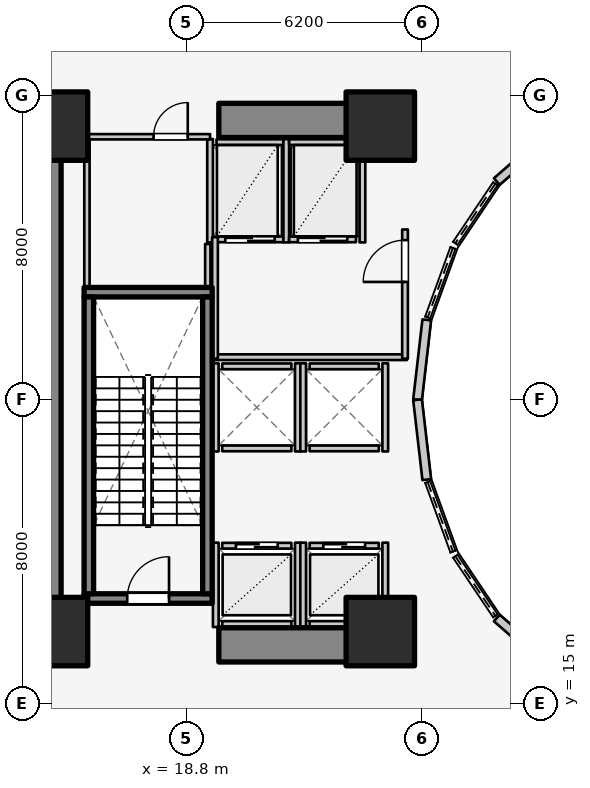
"""IFC4 building model, lengths in metres.
Left out: names, types, materials, properties, quantities, classifications, styles, units other than length and angle.
Written with IfcOpenShell. Run it as: python <this file> out.ifc"""

import sys

from ifc_helpers import new_model, si_unit, direction, frame, frame_2d, origin, origin_2d, place, context, subcontext, project, spatial, rectangle, extrude, element, fill, save


model = new_model("IFC4")
c1 = context("Model", 3, precision=1e-05, world=origin(), true_north=direction((0.0, 1.0)))
c2 = subcontext(c1, "Body", "Model", "MODEL_VIEW")
j1 = project(units=[si_unit("LENGTHUNIT", "METRE"), si_unit("PLANEANGLEUNIT", "RADIAN")], contexts=[c1])
p1 = place(None, origin())
s1 = spatial("IfcSite", under=j1, at=p1, CompositionType="ELEMENT")
p2 = place(p1, origin())
s2 = spatial("IfcBuilding", under=s1, at=p2, CompositionType="ELEMENT")
p3 = place(p2, frame((0.0, 0.0, 4.6)))
s3 = spatial("IfcBuildingStorey", under=s2, at=p3, CompositionType="ELEMENT", Elevation=4.6)
p4 = place(p3, frame((15.05, 17.05, 0.0), z_axis=(0.0, 0.0, 1.0), x_axis=(0.0, 1.0, 0.0)))
e1 = element("IfcWall", 1, at=p4, inside=s3, PredefinedType="SHEAR", context=c2, shape_type="SweptSolid", body=[
    extrude(rectangle(XDim=12.8, YDim=0.9, at=frame_2d((6.4, 0.0))), origin(), (0.0, 0.0, 1.0), 4.6),
])
for number, where, z_axis, x_axis in (
    (2, (19.65, 16.55, 0.0), (0.0, 0.0, 1.0), (1.0, 0.0, 0.0)),
    (3, (19.65, 30.35, 0.0), (0.0, 0.0, 1.0), (1.0, 0.0, 0.0)),
):
    element("IfcWall", number, at=place(p3, frame(where, z_axis=z_axis, x_axis=x_axis)), inside=s3, PredefinedType="SHEAR", context=c2, shape_type="SweptSolid", body=[
        extrude(rectangle(XDim=4.5, YDim=0.9, at=frame_2d((2.25, 0.0))), origin(), (0.0, 0.0, 1.0), 4.6),
    ])
p5 = place(p3, frame((16.105, 17.77, 0.0), z_axis=(0.0, 0.0, 1.0), x_axis=(1.0, 0.0, 0.0)))
e4 = element("IfcWall", 4, at=p5, inside=s3, PredefinedType="SOLIDWALL", context=c2, shape_type="SweptSolid", body=[
    extrude(rectangle(XDim=3.37, YDim=0.25, at=frame_2d((1.685, 0.0))), origin(), (0.0, 0.0, 1.0), 4.6),
])
p6 = place(p5, frame((1.135, 0.0, 0.0)))
e5 = element("IfcOpeningElement", 5, at=p6, cuts=e4, PredefinedType="OPENING", context=c2, shape_type="SweptSolid", body=[
    extrude(rectangle(XDim=1.1, YDim=2.1, at=frame_2d((0.55, 1.05))), frame((0.0, 0.135, 0.0), z_axis=(0.0, -1.0, 0.0), x_axis=(1.0, 0.0, 0.0)), (0.0, 0.0, 1.0), 0.27),
])
p7 = place(p3, frame((16.105, 25.83, 0.0), z_axis=(0.0, 0.0, 1.0), x_axis=(1.0, 0.0, 0.0)))
e6 = element("IfcWall", 6, at=p7, inside=s3, PredefinedType="SOLIDWALL", context=c2, shape_type="SweptSolid", body=[
    extrude(rectangle(XDim=3.37, YDim=0.25, at=frame_2d((1.685, 0.0))), origin(), (0.0, 0.0, 1.0), 4.6),
])
for number, where, z_axis, x_axis in (
    (7, (16.23, 17.895, 0.0), (0.0, 0.0, 1.0), (0.0, 1.0, 0.0)),
    (8, (19.35, 17.895, 0.0), (0.0, 0.0, 1.0), (0.0, 1.0, 0.0)),
):
    element("IfcWall", number, at=place(p3, frame(where, z_axis=z_axis, x_axis=x_axis)), inside=s3, PredefinedType="SOLIDWALL", context=c2, shape_type="SweptSolid", body=[
        extrude(rectangle(XDim=7.81, YDim=0.25, at=frame_2d((3.905, 0.0))), origin(), (0.0, 0.0, 1.0), 4.6),
    ])
for number, where, z_axis, x_axis in (
    (9, (15.3, 16.9, 0.0), (0.0, 0.0, 1.0), (1.0, 0.0, 0.0)),
    (10, (23.9, 16.9, 0.0), (0.0, 0.0, 1.0), (1.0, 0.0, 0.0)),
    (11, (23.9, 30.2, 0.0), (0.0, 0.0, 1.0), (1.0, 0.0, 0.0)),
    (12, (15.3, 30.2, 0.0), (0.0, 0.0, 1.0), (1.0, 0.0, 0.0)),
):
    element("IfcColumn", number, at=place(p3, frame(where, z_axis=z_axis, x_axis=x_axis)), inside=s3, PredefinedType="COLUMN", context=c2, shape_type="SweptSolid", body=[
        extrude(rectangle(XDim=1.8, YDim=1.8, at=origin_2d()), origin(), (0.0, 0.0, 1.0), 4.6),
    ])
p8 = place(p3, frame((28.44, 30.032, 0.0), z_axis=(0.0, 0.0, 1.0), x_axis=(-0.752576694707, -0.658504607869, 0.0)))
e13 = element("IfcWall", 13, at=p8, inside=s3, PredefinedType="STANDARD", context=c2, shape_type="SweptSolid", body=[
    extrude(rectangle(XDim=1.959, YDim=0.23, at=frame_2d((0.98, 0.0))), origin(), (0.0, 0.0, 1.0), 3.28),
])
for number, where, z_axis, x_axis in (
    (14, (25.123, 25.102, 0.0), (0.0, 0.0, 1.0), (-0.115, -0.993, 0.0)),
    (15, (24.88, 23.0, 0.0), (0.0, 0.0, 1.0), (0.115, -0.993, 0.0)),
):
    element("IfcWall", number, at=place(p3, frame(where, z_axis=z_axis, x_axis=x_axis)), inside=s3, PredefinedType="STANDARD", context=c2, shape_type="SweptSolid", body=[
        extrude(rectangle(XDim=2.115, YDim=0.23, at=frame_2d((1.058, 0.0))), origin(), (0.0, 0.0, 1.0), 3.28),
    ])
p9 = place(p3, frame((26.965, 17.258, 0.0), z_axis=(0.0, 0.0, 1.0), x_axis=(0.752576694707, -0.658504607869, 0.0)))
e16 = element("IfcWall", 16, at=p9, inside=s3, PredefinedType="STANDARD", context=c2, shape_type="SweptSolid", body=[
    extrude(rectangle(XDim=1.959, YDim=0.23, at=frame_2d((0.98, 0.0))), origin(), (0.0, 0.0, 1.0), 3.28),
])
p10 = place(p3, frame((19.74, 19.16, 0.0), z_axis=(0.0, 0.0, 1.0), x_axis=(1.0, 0.0, 0.0)))
e17 = element("IfcWall", 17, at=p10, inside=s3, PredefinedType="SOLIDWALL", context=c2, shape_type="SweptSolid", body=[
    extrude(rectangle(XDim=1.82, YDim=0.15, at=frame_2d((0.91, 0.0))), origin(), (0.0, 0.0, 1.0), 4.255),
])
p11 = place(p10, frame((0.36, 0.0, 0.0)))
e18 = element("IfcOpeningElement", 18, at=p11, cuts=e17, PredefinedType="OPENING", context=c2, shape_type="SweptSolid", body=[
    extrude(rectangle(XDim=1.1, YDim=2.1, at=frame_2d((0.55, 1.05))), frame((0.0, 0.085, 0.0), z_axis=(0.0, -1.0, 0.0), x_axis=(1.0, 0.0, 0.0)), (0.0, 0.0, 1.0), 0.17),
])
p12 = place(p3, frame((19.74, 17.1, 0.0), z_axis=(0.0, 0.0, 1.0), x_axis=(1.0, 0.0, 0.0)))
e19 = element("IfcWall", 19, at=p12, inside=s3, PredefinedType="SOLIDWALL", context=c2, shape_type="SweptSolid", body=[
    extrude(rectangle(XDim=1.82, YDim=0.15, at=frame_2d((0.91, 0.0))), origin(), (0.0, 0.0, 1.0), 4.255),
])
p13 = place(p3, frame((19.57, 17.02, 0.0), z_axis=(0.0, 0.0, 1.0), x_axis=(0.0, 1.0, 0.0)))
e20 = element("IfcWall", 20, at=p13, inside=s3, PredefinedType="SOLIDWALL", context=c2, shape_type="SweptSolid", body=[
    extrude(rectangle(XDim=2.22, YDim=0.15, at=frame_2d((1.11, 0.0))), origin(), (0.0, 0.0, 1.0), 3.62),
])
p14 = place(p3, frame((21.73, 17.02, 0.0), z_axis=(0.0, 0.0, 1.0), x_axis=(0.0, 1.0, 0.0)))
e21 = element("IfcWall", 21, at=p14, inside=s3, PredefinedType="SOLIDWALL", context=c2, shape_type="SweptSolid", body=[
    extrude(rectangle(XDim=2.22, YDim=0.15, at=frame_2d((1.11, 0.0))), origin(), (0.0, 0.0, 1.0), 4.255),
])
p15 = place(p3, frame((22.04, 19.16, 0.0), z_axis=(0.0, 0.0, 1.0), x_axis=(1.0, 0.0, 0.0)))
e22 = element("IfcWall", 22, at=p15, inside=s3, PredefinedType="SOLIDWALL", context=c2, shape_type="SweptSolid", body=[
    extrude(rectangle(XDim=1.82, YDim=0.15, at=frame_2d((0.91, 0.0))), origin(), (0.0, 0.0, 1.0), 3.62),
])
p16 = place(p15, frame((0.36, 0.0, 0.0)))
e23 = element("IfcOpeningElement", 23, at=p16, cuts=e22, PredefinedType="OPENING", context=c2, shape_type="SweptSolid", body=[
    extrude(rectangle(XDim=1.1, YDim=2.1, at=frame_2d((0.55, 1.05))), frame((0.0, 0.085, 0.0), z_axis=(0.0, -1.0, 0.0), x_axis=(1.0, 0.0, 0.0)), (0.0, 0.0, 1.0), 0.17),
])
p17 = place(p3, frame((22.04, 17.1, 0.0), z_axis=(0.0, 0.0, 1.0), x_axis=(1.0, 0.0, 0.0)))
e24 = element("IfcWall", 24, at=p17, inside=s3, PredefinedType="SOLIDWALL", context=c2, shape_type="SweptSolid", body=[
    extrude(rectangle(XDim=1.82, YDim=0.15, at=frame_2d((0.91, 0.0))), origin(), (0.0, 0.0, 1.0), 3.62),
])
p18 = place(p3, frame((21.87, 17.02, 0.0), z_axis=(0.0, 0.0, 1.0), x_axis=(0.0, 1.0, 0.0)))
e25 = element("IfcWall", 25, at=p18, inside=s3, PredefinedType="SOLIDWALL", context=c2, shape_type="SweptSolid", body=[
    extrude(rectangle(XDim=2.22, YDim=0.15, at=frame_2d((1.11, 0.0))), origin(), (0.0, 0.0, 1.0), 4.255),
])
p19 = place(p3, frame((24.03, 17.02, 0.0), z_axis=(0.0, 0.0, 1.0), x_axis=(0.0, 1.0, 0.0)))
e26 = element("IfcWall", 26, at=p19, inside=s3, PredefinedType="SOLIDWALL", context=c2, shape_type="SweptSolid", body=[
    extrude(rectangle(XDim=2.22, YDim=0.15, at=frame_2d((1.11, 0.0))), origin(), (0.0, 0.0, 1.0), 3.3),
])
for number, where, z_axis, x_axis in (
    (27, (19.74, 21.72, 0.0), (0.0, 0.0, 1.0), (1.0, 0.0, 0.0)),
    (28, (19.74, 23.88, 0.0), (0.0, 0.0, 1.0), (1.0, 0.0, 0.0)),
):
    element("IfcWall", number, at=place(p3, frame(where, z_axis=z_axis, x_axis=x_axis)), inside=s3, PredefinedType="SOLIDWALL", context=c2, shape_type="SweptSolid", body=[
        extrude(rectangle(XDim=1.82, YDim=0.15, at=frame_2d((0.91, 0.0))), origin(), (0.0, 0.0, 1.0), 4.255),
    ])
for number, where, z_axis, x_axis in (
    (29, (19.57, 21.64, 0.0), (0.0, 0.0, 1.0), (0.0, 1.0, 0.0)),
    (30, (21.73, 21.64, 0.0), (0.0, 0.0, 1.0), (0.0, 1.0, 0.0)),
):
    element("IfcWall", number, at=place(p3, frame(where, z_axis=z_axis, x_axis=x_axis)), inside=s3, PredefinedType="SOLIDWALL", context=c2, shape_type="SweptSolid", body=[
        extrude(rectangle(XDim=2.32, YDim=0.15, at=frame_2d((1.16, 0.0))), origin(), (0.0, 0.0, 1.0), 4.255),
    ])
for number, where, z_axis, x_axis in (
    (31, (22.04, 21.72, 0.0), (0.0, 0.0, 1.0), (1.0, 0.0, 0.0)),
    (32, (22.04, 23.88, 0.0), (0.0, 0.0, 1.0), (1.0, 0.0, 0.0)),
):
    element("IfcWall", number, at=place(p3, frame(where, z_axis=z_axis, x_axis=x_axis)), inside=s3, PredefinedType="SOLIDWALL", context=c2, shape_type="SweptSolid", body=[
        extrude(rectangle(XDim=1.82, YDim=0.15, at=frame_2d((0.91, 0.0))), origin(), (0.0, 0.0, 1.0), 3.62),
    ])
p20 = place(p3, frame((21.87, 21.64, 0.0), z_axis=(0.0, 0.0, 1.0), x_axis=(0.0, 1.0, 0.0)))
e33 = element("IfcWall", 33, at=p20, inside=s3, PredefinedType="SOLIDWALL", context=c2, shape_type="SweptSolid", body=[
    extrude(rectangle(XDim=2.32, YDim=0.15, at=frame_2d((1.16, 0.0))), origin(), (0.0, 0.0, 1.0), 4.255),
])
p21 = place(p3, frame((24.03, 21.64, 0.0), z_axis=(0.0, 0.0, 1.0), x_axis=(0.0, 1.0, 0.0)))
e34 = element("IfcWall", 34, at=p21, inside=s3, PredefinedType="SOLIDWALL", context=c2, shape_type="SweptSolid", body=[
    extrude(rectangle(XDim=2.32, YDim=0.15, at=frame_2d((1.16, 0.0))), origin(), (0.0, 0.0, 1.0), 3.62),
])
p22 = place(p3, frame((19.59, 27.22, 0.0), z_axis=(0.0, 0.0, 1.0), x_axis=(1.0, 0.0, 0.0)))
e35 = element("IfcWall", 35, at=p22, inside=s3, PredefinedType="SOLIDWALL", context=c2, shape_type="SweptSolid", body=[
    extrude(rectangle(XDim=1.76, YDim=0.15, at=frame_2d((0.88, 0.0))), origin(), (0.0, 0.0, 1.0), 4.255),
])
p23 = place(p22, frame((0.23, 0.0, 0.0)))
e36 = element("IfcOpeningElement", 36, at=p23, cuts=e35, PredefinedType="OPENING", context=c2, shape_type="SweptSolid", body=[
    extrude(rectangle(XDim=1.3, YDim=2.1, at=frame_2d((0.65, 1.05))), frame((0.0, 0.085, 0.0), z_axis=(0.0, -1.0, 0.0), x_axis=(1.0, 0.0, 0.0)), (0.0, 0.0, 1.0), 0.17),
])
p24 = place(p3, frame((19.59, 29.78, 0.0), z_axis=(0.0, 0.0, 1.0), x_axis=(1.0, 0.0, 0.0)))
e37 = element("IfcWall", 37, at=p24, inside=s3, PredefinedType="SOLIDWALL", context=c2, shape_type="SweptSolid", body=[
    extrude(rectangle(XDim=1.76, YDim=0.15, at=frame_2d((0.88, 0.0))), origin(), (0.0, 0.0, 1.0), 4.255),
])
for number, where, z_axis, x_axis in (
    (38, (19.42, 27.14, 0.0), (0.0, 0.0, 1.0), (0.0, 1.0, 0.0)),
    (39, (21.425, 27.14, 0.0), (0.0, 0.0, 1.0), (0.0, 1.0, 0.0)),
):
    element("IfcWall", number, at=place(p3, frame(where, z_axis=z_axis, x_axis=x_axis)), inside=s3, PredefinedType="SOLIDWALL", context=c2, shape_type="SweptSolid", body=[
        extrude(rectangle(XDim=2.72, YDim=0.15, at=frame_2d((1.36, 0.0))), origin(), (0.0, 0.0, 1.0), 4.255),
    ])
p25 = place(p3, frame((21.5, 27.22, 0.0), z_axis=(0.0, 0.0, 1.0), x_axis=(1.0, 0.0, 0.0)))
e40 = element("IfcWall", 40, at=p25, inside=s3, PredefinedType="SOLIDWALL", context=c2, shape_type="SweptSolid", body=[
    extrude(rectangle(XDim=1.76, YDim=0.15, at=frame_2d((0.88, 0.0))), origin(), (0.0, 0.0, 1.0), 4.255),
])
p26 = place(p25, frame((0.23, 0.0, 0.0)))
e41 = element("IfcOpeningElement", 41, at=p26, cuts=e40, PredefinedType="OPENING", context=c2, shape_type="SweptSolid", body=[
    extrude(rectangle(XDim=1.3, YDim=2.1, at=frame_2d((0.65, 1.05))), frame((0.0, 0.085, 0.0), z_axis=(0.0, -1.0, 0.0), x_axis=(1.0, 0.0, 0.0)), (0.0, 0.0, 1.0), 0.17),
])
p27 = place(p3, frame((21.5, 29.78, 0.0), z_axis=(0.0, 0.0, 1.0), x_axis=(1.0, 0.0, 0.0)))
e42 = element("IfcWall", 42, at=p27, inside=s3, PredefinedType="SOLIDWALL", context=c2, shape_type="SweptSolid", body=[
    extrude(rectangle(XDim=1.76, YDim=0.15, at=frame_2d((0.88, 0.0))), origin(), (0.0, 0.0, 1.0), 4.255),
])
p28 = place(p3, frame((23.43, 27.14, 0.0), z_axis=(0.0, 0.0, 1.0), x_axis=(0.0, 1.0, 0.0)))
e43 = element("IfcWall", 43, at=p28, inside=s3, PredefinedType="SOLIDWALL", context=c2, shape_type="SweptSolid", body=[
    extrude(rectangle(XDim=2.72, YDim=0.15, at=frame_2d((1.36, 0.0))), origin(), (0.0, 0.0, 1.0), 4.255),
])
p29 = place(p3, frame((19.52, 24.12, 0.0), z_axis=(0.0, 0.0, 1.0), x_axis=(1.0, 0.0, 0.0)))
e44 = element("IfcWall", 44, at=p29, inside=s3, PredefinedType="PARTITIONING", context=c2, shape_type="SweptSolid", body=[
    extrude(rectangle(XDim=5.08, YDim=0.15, at=frame_2d((2.54, 0.0))), origin(), (0.0, 0.0, 1.0), 3.62),
])
p30 = place(p3, frame((19.55, 24.08, 0.0), z_axis=(0.0, 0.0, 1.0), x_axis=(0.0, 1.0, 0.0)))
e45 = element("IfcWall", 45, at=p30, inside=s3, PredefinedType="PARTITIONING", context=c2, shape_type="SweptSolid", body=[
    extrude(rectangle(XDim=3.2, YDim=0.15, at=frame_2d((1.6, 0.0))), origin(), (0.0, 0.0, 1.0), 4.255),
])
p31 = place(p3, frame((24.55, 24.08, 0.0), z_axis=(0.0, 0.0, 1.0), x_axis=(0.0, 1.0, 0.0)))
e46 = element("IfcWall", 46, at=p31, inside=s3, PredefinedType="PARTITIONING", context=c2, shape_type="SweptSolid", body=[
    extrude(rectangle(XDim=3.4, YDim=0.15, at=frame_2d((1.7, 0.0))), origin(), (0.0, 0.0, 1.0), 4.255),
])
p32 = place(p31, frame((2.02, 0.0, 0.0)))
e47 = element("IfcOpeningElement", 47, at=p32, cuts=e46, PredefinedType="OPENING", context=c2, shape_type="SweptSolid", body=[
    extrude(rectangle(XDim=1.1, YDim=2.1, at=frame_2d((0.55, 1.05))), frame((0.0, 0.085, 0.0), z_axis=(0.0, -1.0, 0.0), x_axis=(1.0, 0.0, 0.0)), (0.0, 0.0, 1.0), 0.17),
])
p33 = place(p3, frame((16.12, 29.92, 0.0), z_axis=(0.0, 0.0, 1.0), x_axis=(1.0, 0.0, 0.0)))
e48 = element("IfcWall", 48, at=p33, inside=s3, PredefinedType="PLUMBINGWALL", context=c2, shape_type="SweptSolid", body=[
    extrude(rectangle(XDim=3.3, YDim=0.14, at=frame_2d((1.65, 0.0))), origin(), (0.0, 0.0, 1.0), 4.255),
])
p34 = place(p33, frame((1.813, 0.0, 0.0)))
e49 = element("IfcOpeningElement", 49, at=p34, cuts=e48, PredefinedType="OPENING", context=c2, shape_type="SweptSolid", body=[
    extrude(rectangle(XDim=0.9, YDim=2.1, at=frame_2d((0.45, 1.05))), frame((0.0, 0.08, 0.0), z_axis=(0.0, -1.0, 0.0), x_axis=(1.0, 0.0, 0.0)), (0.0, 0.0, 1.0), 0.16),
])
p35 = place(p3, frame((16.18, 25.98, 0.0), z_axis=(0.0, 0.0, 1.0), x_axis=(0.0, 1.0, 0.0)))
e50 = element("IfcWall", 50, at=p35, inside=s3, PredefinedType="PLUMBINGWALL", context=c2, shape_type="SweptSolid", body=[
    extrude(rectangle(XDim=3.88, YDim=0.14, at=frame_2d((1.94, 0.0))), origin(), (0.0, 0.0, 1.0), 4.255),
])
p36 = place(p3, frame((19.36, 25.98, 0.0), z_axis=(0.0, 0.0, 1.0), x_axis=(0.0, 1.0, 0.0)))
e51 = element("IfcWall", 51, at=p36, inside=s3, PredefinedType="PLUMBINGWALL", context=c2, shape_type="SweptSolid", body=[
    extrude(rectangle(XDim=1.12, YDim=0.14, at=frame_2d((0.56, 0.0))), origin(), (0.0, 0.0, 1.0), 4.255),
])
p37 = place(p6, origin())
e52 = element("IfcDoor", 52, at=p37, inside=s3, OperationType="SINGLE_SWING_RIGHT", PredefinedType="DOOR", context=c2, shape_type="SweptSolid", body=[
    extrude(rectangle(XDim=1.1, YDim=2.1, at=frame_2d((0.55, 1.05))), frame((0.0, 0.025, 0.0), z_axis=(0.0, -1.0, 0.0), x_axis=(1.0, 0.0, 0.0)), (0.0, 0.0, 1.0), 0.05),
])
fill(e5, e52)
p38 = place(p11, origin())
e53 = element("IfcDoor", 53, at=p38, inside=s3, OperationType="DOUBLE_DOOR_SLIDING", PredefinedType="DOOR", context=c2, shape_type="SweptSolid", body=[
    extrude(rectangle(XDim=1.1, YDim=2.1, at=frame_2d((0.55, 1.05))), frame((0.0, 0.025, 0.0), z_axis=(0.0, -1.0, 0.0), x_axis=(1.0, 0.0, 0.0)), (0.0, 0.0, 1.0), 0.05),
])
fill(e18, e53)
p39 = place(p16, origin())
e54 = element("IfcDoor", 54, at=p39, inside=s3, OperationType="DOUBLE_DOOR_SLIDING", PredefinedType="DOOR", context=c2, shape_type="SweptSolid", body=[
    extrude(rectangle(XDim=1.1, YDim=2.1, at=frame_2d((0.55, 1.05))), frame((0.0, 0.025, 0.0), z_axis=(0.0, -1.0, 0.0), x_axis=(1.0, 0.0, 0.0)), (0.0, 0.0, 1.0), 0.05),
])
fill(e23, e54)
p40 = place(p23, origin())
e55 = element("IfcDoor", 55, at=p40, inside=s3, OperationType="DOUBLE_DOOR_SLIDING", PredefinedType="DOOR", context=c2, shape_type="SweptSolid", body=[
    extrude(rectangle(XDim=1.3, YDim=2.1, at=frame_2d((0.65, 1.05))), frame((0.0, 0.025, 0.0), z_axis=(0.0, -1.0, 0.0), x_axis=(1.0, 0.0, 0.0)), (0.0, 0.0, 1.0), 0.05),
])
fill(e36, e55)
p41 = place(p26, origin())
e56 = element("IfcDoor", 56, at=p41, inside=s3, OperationType="DOUBLE_DOOR_SLIDING", PredefinedType="DOOR", context=c2, shape_type="SweptSolid", body=[
    extrude(rectangle(XDim=1.3, YDim=2.1, at=frame_2d((0.65, 1.05))), frame((0.0, 0.025, 0.0), z_axis=(0.0, -1.0, 0.0), x_axis=(1.0, 0.0, 0.0)), (0.0, 0.0, 1.0), 0.05),
])
fill(e41, e56)
p42 = place(p32, origin())
e57 = element("IfcDoor", 57, at=p42, inside=s3, OperationType="SINGLE_SWING_LEFT", PredefinedType="DOOR", context=c2, shape_type="SweptSolid", body=[
    extrude(rectangle(XDim=1.1, YDim=2.1, at=frame_2d((0.55, 1.05))), frame((0.0, 0.025, 0.0), z_axis=(0.0, -1.0, 0.0), x_axis=(1.0, 0.0, 0.0)), (0.0, 0.0, 1.0), 0.05),
])
fill(e47, e57)
p43 = place(p34, origin())
e58 = element("IfcDoor", 58, at=p43, inside=s3, OperationType="SINGLE_SWING_RIGHT", PredefinedType="DOOR", context=c2, shape_type="SweptSolid", body=[
    extrude(rectangle(XDim=0.9, YDim=2.1, at=frame_2d((0.45, 1.05))), frame((0.0, 0.025, 0.0), z_axis=(0.0, -1.0, 0.0), x_axis=(1.0, 0.0, 0.0)), (0.0, 0.0, 1.0), 0.05),
])
fill(e49, e58)
save(model, sys.argv[1])
